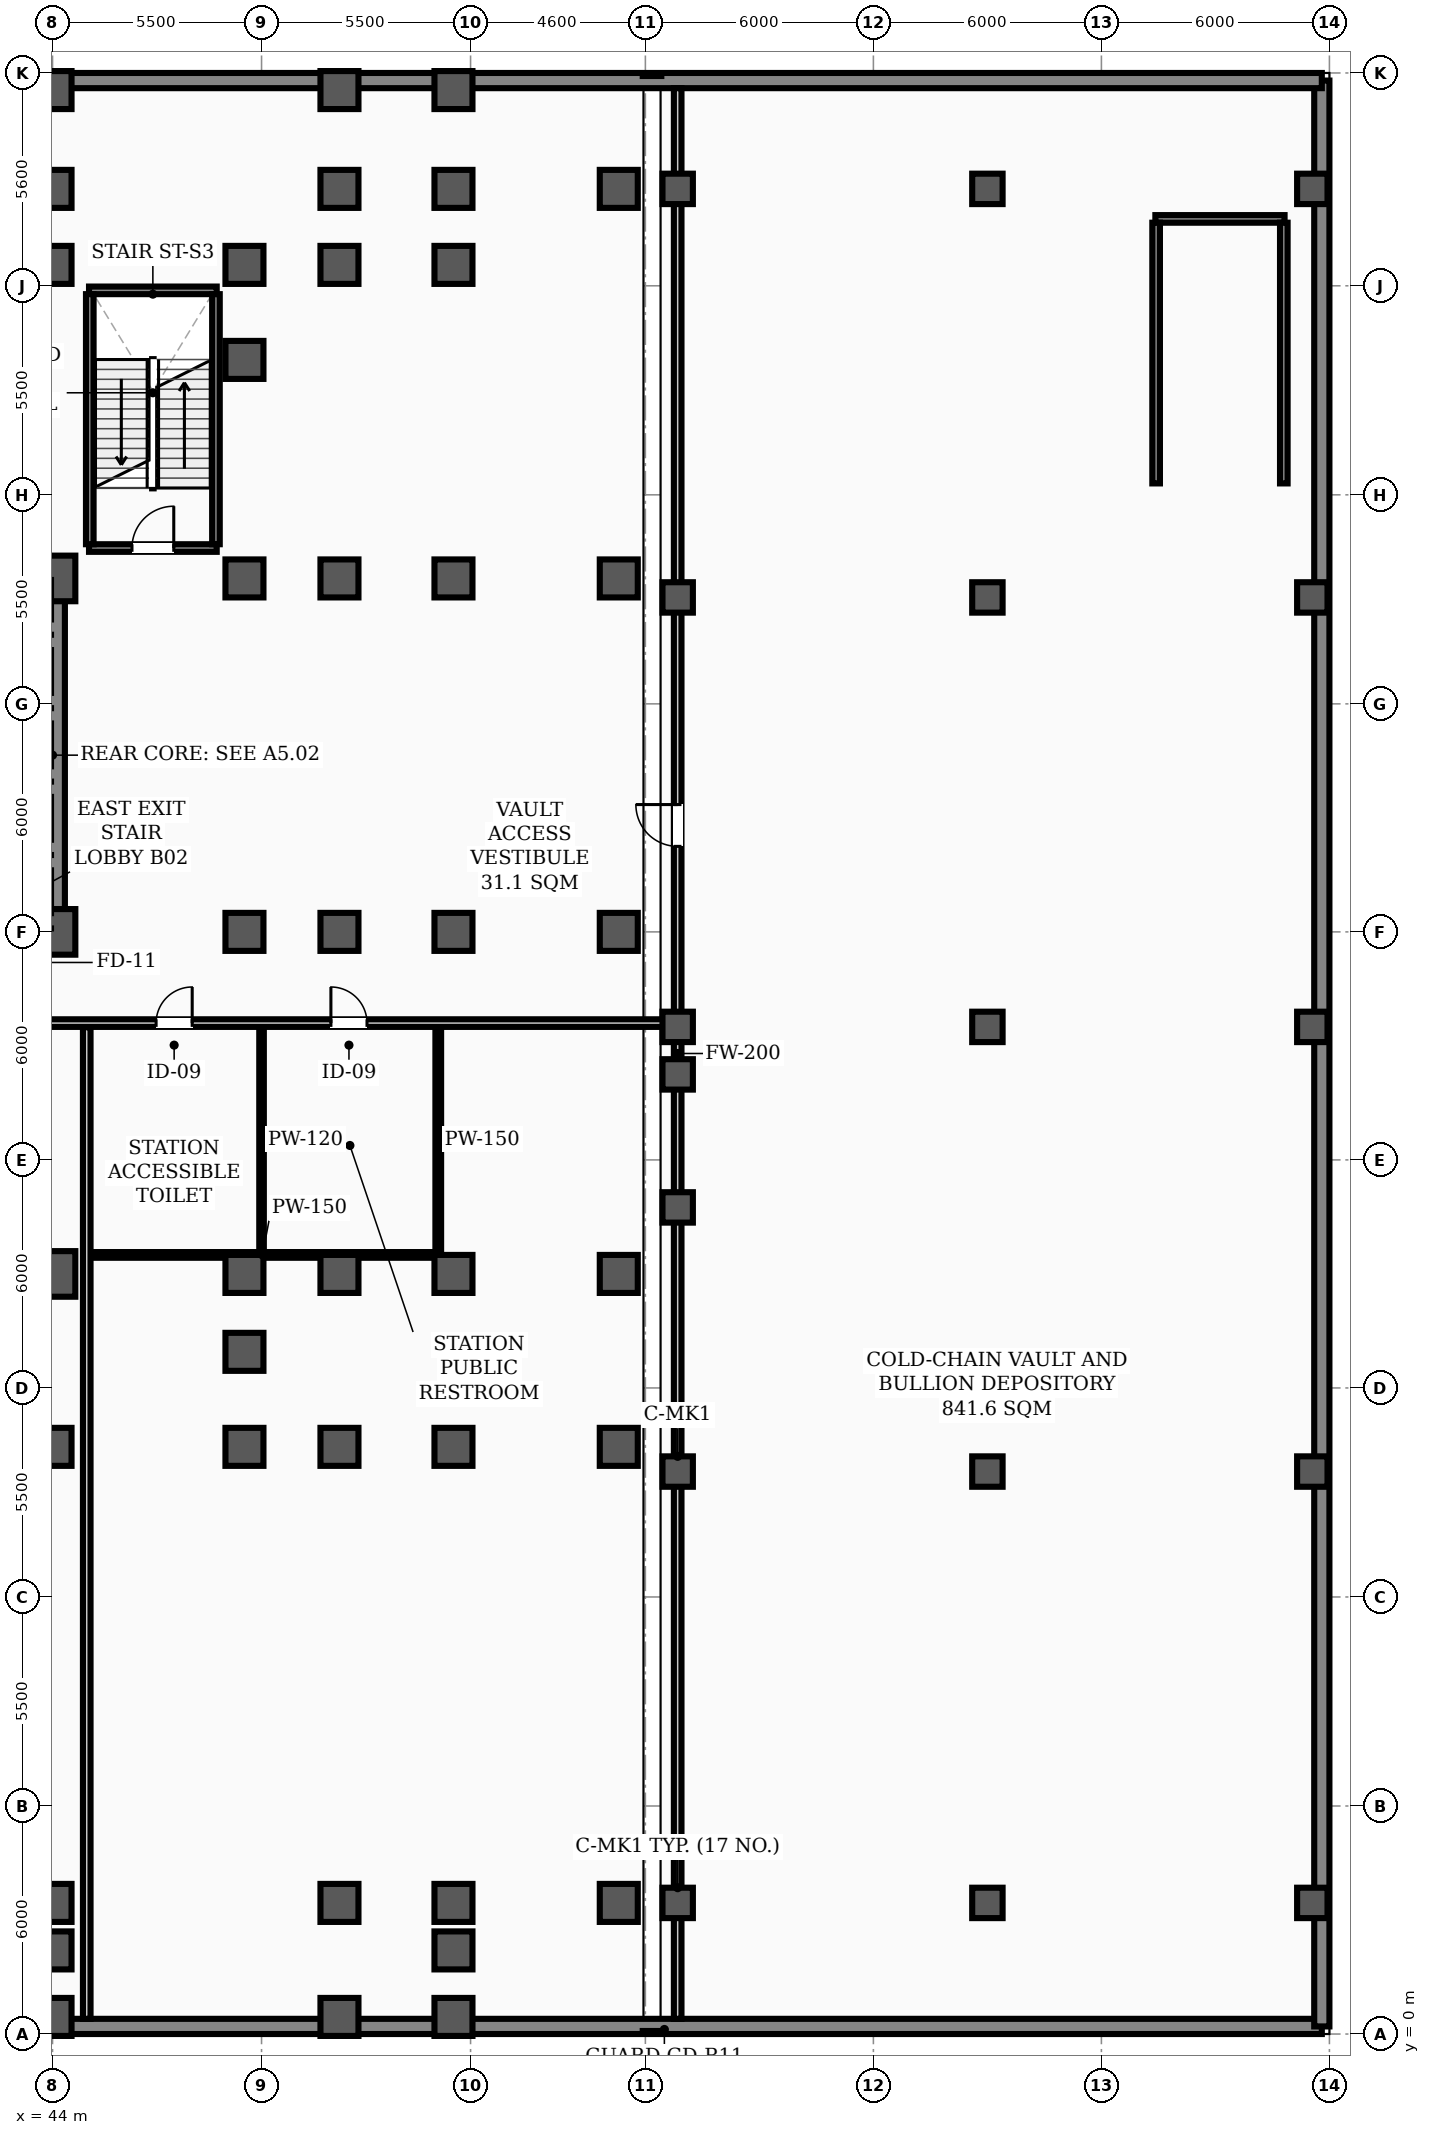
"""IFC4 building model, lengths in metres.
Left out: names, types, materials, properties, quantities, classifications, styles, units other than length and angle.
Written with IfcOpenShell. Run it as: python <this file> out.ifc"""

import sys

from ifc_helpers import new_model, si_unit, direction, frame, frame_2d, origin, origin_2d, place, context, subcontext, project, spatial, rectangle, hollow_rectangle, extrude, element, fill, save


model = new_model("IFC4")
c1 = context("Model", 3, precision=1e-05, world=origin(), true_north=direction((0.0, 1.0)))
c2 = subcontext(c1, "Body", "Model", "MODEL_VIEW")
j1 = project(units=[si_unit("LENGTHUNIT", "METRE"), si_unit("PLANEANGLEUNIT", "RADIAN")], contexts=[c1])
p1 = place(None, origin())
s1 = spatial("IfcSite", under=j1, at=p1, CompositionType="ELEMENT")
p2 = place(p1, origin())
s2 = spatial("IfcBuilding", under=s1, at=p2, CompositionType="ELEMENT")
p3 = place(p2, frame((0.0, 0.0, -10.2)))
s3 = spatial("IfcBuildingStorey", under=s2, at=p3, CompositionType="ELEMENT", Elevation=-10.2)
for number, where, z_axis, x_axis in (
    (1, (44.0, 29.0, 0.0), (0.0, 0.0, 1.0), (1.0, 0.0, 0.0)),
    (2, (44.0, 38.3, 0.0), (0.0, 0.0, 1.0), (1.0, 0.0, 0.0)),
    (3, (44.0, 20.0, 0.0), (0.0, 0.0, 1.0), (1.0, 0.0, 0.0)),
):
    element("IfcColumn", number, at=place(p3, frame(where, z_axis=z_axis, x_axis=x_axis)), inside=s3, PredefinedType="COLUMN", context=c2, shape_type="SweptSolid", body=[
        extrude(hollow_rectangle(XDim=1.2, YDim=1.2, WallThickness=0.04, InnerFilletRadius=0.02, OuterFilletRadius=0.06, at=origin_2d()), origin(), (0.0, 0.0, 1.0), 5.2),
    ])
for number, where, z_axis, x_axis in (
    (4, (44.0, 0.45, 0.0), (0.0, 0.0, 1.0), (1.0, 0.0, 0.0)),
    (5, (44.0, 2.2, 0.0), (0.0, 0.0, 1.0), (1.0, 0.0, 0.0)),
    (6, (44.0, 3.45, 0.0), (0.0, 0.0, 1.0), (1.0, 0.0, 0.0)),
    (7, (44.0, 15.45, 0.0), (0.0, 0.0, 1.0), (1.0, 0.0, 0.0)),
    (8, (44.0, 46.55, 0.0), (0.0, 0.0, 1.0), (1.0, 0.0, 0.0)),
    (9, (44.0, 48.55, 0.0), (0.0, 0.0, 1.0), (1.0, 0.0, 0.0)),
    (10, (44.0, 51.15, 0.0), (0.0, 0.0, 1.0), (1.0, 0.0, 0.0)),
    (11, (49.05, 15.45, 0.0), (0.0, 0.0, 1.0), (1.0, 0.0, 0.0)),
    (12, (49.05, 17.95, 0.0), (0.0, 0.0, 1.0), (1.0, 0.0, 0.0)),
    (13, (49.05, 20.0, 0.0), (0.0, 0.0, 1.0), (1.0, 0.0, 0.0)),
    (14, (49.05, 29.0, 0.0), (0.0, 0.0, 1.0), (1.0, 0.0, 0.0)),
    (15, (49.05, 38.3, 0.0), (0.0, 0.0, 1.0), (1.0, 0.0, 0.0)),
    (16, (49.05, 44.05, 0.0), (0.0, 0.0, 1.0), (1.0, 0.0, 0.0)),
    (17, (49.05, 46.55, 0.0), (0.0, 0.0, 1.0), (1.0, 0.0, 0.0)),
    (18, (51.55, 0.45, 0.0), (0.0, 0.0, 1.0), (1.0, 0.0, 0.0)),
    (19, (51.55, 3.45, 0.0), (0.0, 0.0, 1.0), (1.0, 0.0, 0.0)),
    (20, (51.55, 15.45, 0.0), (0.0, 0.0, 1.0), (1.0, 0.0, 0.0)),
    (21, (51.55, 20.0, 0.0), (0.0, 0.0, 1.0), (1.0, 0.0, 0.0)),
    (22, (51.55, 29.0, 0.0), (0.0, 0.0, 1.0), (1.0, 0.0, 0.0)),
    (23, (51.55, 38.3, 0.0), (0.0, 0.0, 1.0), (1.0, 0.0, 0.0)),
    (24, (51.55, 46.55, 0.0), (0.0, 0.0, 1.0), (1.0, 0.0, 0.0)),
    (25, (51.55, 48.55, 0.0), (0.0, 0.0, 1.0), (1.0, 0.0, 0.0)),
    (26, (51.55, 51.15, 0.0), (0.0, 0.0, 1.0), (1.0, 0.0, 0.0)),
    (27, (54.55, 0.45, 0.0), (0.0, 0.0, 1.0), (1.0, 0.0, 0.0)),
    (28, (54.55, 2.2, 0.0), (0.0, 0.0, 1.0), (1.0, 0.0, 0.0)),
    (29, (54.55, 3.45, 0.0), (0.0, 0.0, 1.0), (1.0, 0.0, 0.0)),
    (30, (54.55, 15.45, 0.0), (0.0, 0.0, 1.0), (1.0, 0.0, 0.0)),
    (31, (54.55, 20.0, 0.0), (0.0, 0.0, 1.0), (1.0, 0.0, 0.0)),
    (32, (54.55, 29.0, 0.0), (0.0, 0.0, 1.0), (1.0, 0.0, 0.0)),
    (33, (54.55, 38.3, 0.0), (0.0, 0.0, 1.0), (1.0, 0.0, 0.0)),
    (34, (54.55, 46.55, 0.0), (0.0, 0.0, 1.0), (1.0, 0.0, 0.0)),
    (35, (54.55, 48.55, 0.0), (0.0, 0.0, 1.0), (1.0, 0.0, 0.0)),
    (36, (54.55, 51.15, 0.0), (0.0, 0.0, 1.0), (1.0, 0.0, 0.0)),
    (37, (58.9, 3.45, 0.0), (0.0, 0.0, 1.0), (1.0, 0.0, 0.0)),
    (38, (58.9, 15.45, 0.0), (0.0, 0.0, 1.0), (1.0, 0.0, 0.0)),
    (39, (58.9, 20.0, 0.0), (0.0, 0.0, 1.0), (1.0, 0.0, 0.0)),
    (40, (58.9, 29.0, 0.0), (0.0, 0.0, 1.0), (1.0, 0.0, 0.0)),
    (41, (58.9, 38.3, 0.0), (0.0, 0.0, 1.0), (1.0, 0.0, 0.0)),
    (42, (58.9, 48.55, 0.0), (0.0, 0.0, 1.0), (1.0, 0.0, 0.0)),
):
    element("IfcColumn", number, at=place(p3, frame(where, z_axis=z_axis, x_axis=x_axis)), inside=s3, PredefinedType="COLUMN", context=c2, shape_type="SweptSolid", body=[
        extrude(rectangle(XDim=1.0, YDim=1.0, at=origin_2d()), origin(), (0.0, 0.0, 1.0), 5.2),
    ])
for number, where, z_axis, x_axis in (
    (43, (60.45, 3.45, 0.0), (0.0, 0.0, 1.0), (1.0, 0.0, 0.0)),
    (44, (60.45, 14.8, 0.0), (0.0, 0.0, 1.0), (1.0, 0.0, 0.0)),
    (45, (60.45, 21.75, 0.0), (0.0, 0.0, 1.0), (1.0, 0.0, 0.0)),
    (46, (60.45, 25.25, 0.0), (0.0, 0.0, 1.0), (1.0, 0.0, 0.0)),
    (47, (60.45, 26.5, 0.0), (0.0, 0.0, 1.0), (1.0, 0.0, 0.0)),
    (48, (60.45, 37.8, 0.0), (0.0, 0.0, 1.0), (1.0, 0.0, 0.0)),
    (49, (60.45, 48.55, 0.0), (0.0, 0.0, 1.0), (1.0, 0.0, 0.0)),
    (50, (68.6, 3.45, 0.0), (0.0, 0.0, 1.0), (1.0, 0.0, 0.0)),
    (51, (68.6, 14.8, 0.0), (0.0, 0.0, 1.0), (1.0, 0.0, 0.0)),
    (52, (68.6, 26.5, 0.0), (0.0, 0.0, 1.0), (1.0, 0.0, 0.0)),
    (53, (68.6, 37.8, 0.0), (0.0, 0.0, 1.0), (1.0, 0.0, 0.0)),
    (54, (68.6, 48.55, 0.0), (0.0, 0.0, 1.0), (1.0, 0.0, 0.0)),
    (55, (77.15, 3.45, 0.0), (0.0, 0.0, 1.0), (1.0, 0.0, 0.0)),
    (56, (77.15, 14.8, 0.0), (0.0, 0.0, 1.0), (1.0, 0.0, 0.0)),
    (57, (77.15, 26.5, 0.0), (0.0, 0.0, 1.0), (1.0, 0.0, 0.0)),
    (58, (77.15, 37.8, 0.0), (0.0, 0.0, 1.0), (1.0, 0.0, 0.0)),
    (59, (77.15, 48.55, 0.0), (0.0, 0.0, 1.0), (1.0, 0.0, 0.0)),
):
    element("IfcColumn", number, at=place(p3, frame(where, z_axis=z_axis, x_axis=x_axis)), inside=s3, PredefinedType="COLUMN", context=c2, shape_type="SweptSolid", body=[
        extrude(rectangle(XDim=0.8, YDim=0.8, at=origin_2d()), origin(), (0.0, 0.0, 1.0), 5.2),
    ])
p4 = place(p3, frame((0.2, 0.2, 0.0), z_axis=(0.0, 0.0, 1.0), x_axis=(1.0, 0.0, 0.0)))
e60 = element("IfcWall", 60, at=p4, inside=s3, PredefinedType="SOLIDWALL", context=c2, shape_type="SweptSolid", body=[
    extrude(rectangle(XDim=77.2, YDim=0.4, at=frame_2d((38.6, 0.0))), origin(), (0.0, 0.0, 1.0), 4.92),
])
p5 = place(p3, frame((77.4, 0.2, 0.0), z_axis=(0.0, 0.0, 1.0), x_axis=(0.0, 1.0, 0.0)))
e61 = element("IfcWall", 61, at=p5, inside=s3, PredefinedType="SOLIDWALL", context=c2, shape_type="SweptSolid", body=[
    extrude(rectangle(XDim=51.2, YDim=0.4, at=frame_2d((25.6, 0.0))), origin(), (0.0, 0.0, 1.0), 4.92),
])
p6 = place(p3, frame((77.4, 51.4, 0.0), z_axis=(0.0, 0.0, 1.0), x_axis=(-1.0, 0.0, 0.0)))
e62 = element("IfcWall", 62, at=p6, inside=s3, PredefinedType="SOLIDWALL", context=c2, shape_type="SweptSolid", body=[
    extrude(rectangle(XDim=77.2, YDim=0.4, at=frame_2d((38.6, 0.0))), origin(), (0.0, 0.0, 1.0), 4.92),
])
p7 = place(p3, frame((44.0, 29.35, 0.0), z_axis=(0.0, 0.0, 1.0), x_axis=(0.0, 1.0, 0.0)))
e63 = element("IfcWall", 63, at=p7, inside=s3, PredefinedType="SHEAR", context=c2, shape_type="SweptSolid", body=[
    extrude(rectangle(XDim=8.6, YDim=0.65, at=frame_2d((4.3, 0.0))), origin(), (0.0, 0.0, 1.0), 4.92),
])
p8 = place(p3, frame((73.02, 47.76, 0.0), z_axis=(0.0, 0.0, 1.0), x_axis=(1.0, 0.0, 0.0)))
e64 = element("IfcWall", 64, at=p8, inside=s3, PredefinedType="STANDARD", context=c2, shape_type="SweptSolid", body=[
    extrude(rectangle(XDim=3.4, YDim=0.2, at=frame_2d((1.7, 0.0))), origin(), (0.0, 0.0, 1.0), 4.92),
])
for number, where, z_axis, x_axis in (
    (65, (73.04, 40.8, 0.0), (0.0, 0.0, 1.0), (0.0, 1.0, 0.0)),
    (66, (76.4, 40.8, 0.0), (0.0, 0.0, 1.0), (0.0, 1.0, 0.0)),
):
    element("IfcWall", number, at=place(p3, frame(where, z_axis=z_axis, x_axis=x_axis)), inside=s3, PredefinedType="STANDARD", context=c2, shape_type="SweptSolid", body=[
        extrude(rectangle(XDim=6.86, YDim=0.2, at=frame_2d((3.43, 0.0))), origin(), (0.0, 0.0, 1.0), 4.92),
    ])
p9 = place(p3, frame((44.96, 39.1, 0.0), z_axis=(0.0, 0.0, 1.0), x_axis=(1.0, 0.0, 0.0)))
e67 = element("IfcWall", 67, at=p9, inside=s3, PredefinedType="STANDARD", context=c2, shape_type="SweptSolid", body=[
    extrude(rectangle(XDim=3.36, YDim=0.2, at=frame_2d((1.68, 0.0))), origin(), (0.0, 0.0, 1.0), 4.92),
])
p10 = place(p9, frame((1.13, 0.0, 0.0)))
e68 = element("IfcOpeningElement", 68, at=p10, cuts=e67, PredefinedType="OPENING", context=c2, shape_type="SweptSolid", body=[
    extrude(rectangle(XDim=1.1, YDim=2.08, at=frame_2d((0.55, 1.04))), frame((0.0, 0.11, 0.0), z_axis=(0.0, -1.0, 0.0), x_axis=(1.0, 0.0, 0.0)), (0.0, 0.0, 1.0), 0.22),
])
p11 = place(p3, frame((44.96, 45.88, 0.0), z_axis=(0.0, 0.0, 1.0), x_axis=(1.0, 0.0, 0.0)))
e69 = element("IfcWall", 69, at=p11, inside=s3, PredefinedType="STANDARD", context=c2, shape_type="SweptSolid", body=[
    extrude(rectangle(XDim=3.36, YDim=0.2, at=frame_2d((1.68, 0.0))), origin(), (0.0, 0.0, 1.0), 4.92),
])
for number, where, z_axis, x_axis in (
    (70, (44.98, 39.2, 0.0), (0.0, 0.0, 1.0), (0.0, 1.0, 0.0)),
    (71, (48.3, 39.2, 0.0), (0.0, 0.0, 1.0), (0.0, 1.0, 0.0)),
):
    element("IfcWall", number, at=place(p3, frame(where, z_axis=z_axis, x_axis=x_axis)), inside=s3, PredefinedType="STANDARD", context=c2, shape_type="SweptSolid", body=[
        extrude(rectangle(XDim=6.58, YDim=0.2, at=frame_2d((3.29, 0.0))), origin(), (0.0, 0.0, 1.0), 4.92),
    ])
p12 = place(p3, frame((0.4, 26.6, 0.0), z_axis=(0.0, 0.0, 1.0), x_axis=(1.0, 0.0, 0.0)))
e72 = element("IfcWall", 72, at=p12, inside=s3, PredefinedType="STANDARD", context=c2, shape_type="SweptSolid", body=[
    extrude(rectangle(XDim=60.05, YDim=0.2, at=frame_2d((30.025, 0.0))), origin(), (0.0, 0.0, 1.0), 4.2),
])
p13 = place(p12, frame((18.2, 0.0, 0.0)))
e73 = element("IfcOpeningElement", 73, at=p13, cuts=e72, PredefinedType="OPENING", context=c2, shape_type="SweptSolid", body=[
    extrude(rectangle(XDim=1.8, YDim=2.08, at=frame_2d((0.9, 1.04))), frame((0.0, 0.11, 0.0), z_axis=(0.0, -1.0, 0.0), x_axis=(1.0, 0.0, 0.0)), (0.0, 0.0, 1.0), 0.22),
])
p14 = place(p12, frame((40.25, 0.0, 0.0)))
e74 = element("IfcOpeningElement", 74, at=p14, cuts=e72, PredefinedType="OPENING", context=c2, shape_type="SweptSolid", body=[
    extrude(rectangle(XDim=1.1, YDim=2.08, at=frame_2d((0.55, 1.04))), frame((0.0, 0.11, 0.0), z_axis=(0.0, -1.0, 0.0), x_axis=(1.0, 0.0, 0.0)), (0.0, 0.0, 1.0), 0.22),
])
p15 = place(p12, frame((46.325, 0.0, 0.0)))
e75 = element("IfcOpeningElement", 75, at=p15, cuts=e72, PredefinedType="OPENING", context=c2, shape_type="SweptSolid", body=[
    extrude(rectangle(XDim=0.95, YDim=2.08, at=frame_2d((0.475, 1.04))), frame((0.0, 0.11, 0.0), z_axis=(0.0, -1.0, 0.0), x_axis=(1.0, 0.0, 0.0)), (0.0, 0.0, 1.0), 0.22),
])
p16 = place(p12, frame((50.925, 0.0, 0.0)))
e76 = element("IfcOpeningElement", 76, at=p16, cuts=e72, PredefinedType="OPENING", context=c2, shape_type="SweptSolid", body=[
    extrude(rectangle(XDim=0.95, YDim=2.08, at=frame_2d((0.475, 1.04))), frame((0.0, 0.11, 0.0), z_axis=(0.0, -1.0, 0.0), x_axis=(1.0, 0.0, 0.0)), (0.0, 0.0, 1.0), 0.22),
])
p17 = place(p3, frame((44.9, 20.5, 0.0), z_axis=(0.0, 0.0, 1.0), x_axis=(1.0, 0.0, 0.0)))
e77 = element("IfcWall", 77, at=p17, inside=s3, PredefinedType="PARTITIONING", context=c2, shape_type="SweptSolid", body=[
    extrude(rectangle(XDim=9.25, YDim=0.15, at=frame_2d((4.625, 0.0))), origin(), (0.0, 0.0, 1.0), 4.1),
])
p18 = place(p3, frame((44.9, 0.4, 0.0), z_axis=(0.0, 0.0, 1.0), x_axis=(0.0, 1.0, 0.0)))
e78 = element("IfcWall", 78, at=p18, inside=s3, PredefinedType="STANDARD", context=c2, shape_type="SweptSolid", body=[
    extrude(rectangle(XDim=26.09, YDim=0.2, at=frame_2d((13.045, 0.0))), origin(), (0.0, 0.0, 1.0), 4.1),
])
p19 = place(p3, frame((49.5, 20.585, 0.0), z_axis=(0.0, 0.0, 1.0), x_axis=(0.0, 1.0, 0.0)))
e79 = element("IfcWall", 79, at=p19, inside=s3, PredefinedType="PARTITIONING", context=c2, shape_type="SweptSolid", body=[
    extrude(rectangle(XDim=5.905, YDim=0.12, at=frame_2d((2.953, 0.0))), origin(), (0.0, 0.0, 1.0), 4.1),
])
p20 = place(p3, frame((54.15, 20.585, 0.0), z_axis=(0.0, 0.0, 1.0), x_axis=(0.0, 1.0, 0.0)))
e80 = element("IfcWall", 80, at=p20, inside=s3, PredefinedType="PARTITIONING", context=c2, shape_type="SweptSolid", body=[
    extrude(rectangle(XDim=5.905, YDim=0.15, at=frame_2d((2.953, 0.0))), origin(), (0.0, 0.0, 1.0), 4.1),
])
p21 = place(p3, frame((60.45, 0.4, 0.0), z_axis=(0.0, 0.0, 1.0), x_axis=(0.0, 1.0, 0.0)))
e81 = element("IfcWall", 81, at=p21, inside=s3, PredefinedType="STANDARD", context=c2, shape_type="SweptSolid", body=[
    extrude(rectangle(XDim=50.8, YDim=0.2, at=frame_2d((25.4, 0.0))), origin(), (0.0, 0.0, 1.0), 4.2),
])
p22 = place(p21, frame((30.85, 0.0, 0.0)))
e82 = element("IfcOpeningElement", 82, at=p22, cuts=e81, PredefinedType="OPENING", context=c2, shape_type="SweptSolid", body=[
    extrude(rectangle(XDim=1.1, YDim=2.08, at=frame_2d((0.55, 1.04))), frame((0.0, 0.11, 0.0), z_axis=(0.0, -1.0, 0.0), x_axis=(1.0, 0.0, 0.0)), (0.0, 0.0, 1.0), 0.22),
])
p23 = place(p10, origin())
e83 = element("IfcDoor", 83, at=p23, inside=s3, OperationType="SINGLE_SWING_RIGHT", PredefinedType="DOOR", context=c2, shape_type="SweptSolid", body=[
    extrude(rectangle(XDim=1.1, YDim=2.08, at=frame_2d((0.55, 1.04))), frame((0.0, 0.025, 0.0), z_axis=(0.0, -1.0, 0.0), x_axis=(1.0, 0.0, 0.0)), (0.0, 0.0, 1.0), 0.05),
])
fill(e68, e83)
p24 = place(p15, origin())
e84 = element("IfcDoor", 84, at=p24, inside=s3, OperationType="SINGLE_SWING_RIGHT", PredefinedType="DOOR", context=c2, shape_type="SweptSolid", body=[
    extrude(rectangle(XDim=0.95, YDim=2.08, at=frame_2d((0.475, 1.04))), frame((0.0, 0.025, 0.0), z_axis=(0.0, -1.0, 0.0), x_axis=(1.0, 0.0, 0.0)), (0.0, 0.0, 1.0), 0.05),
])
fill(e75, e84)
p25 = place(p16, origin())
e85 = element("IfcDoor", 85, at=p25, inside=s3, OperationType="SINGLE_SWING_LEFT", PredefinedType="DOOR", context=c2, shape_type="SweptSolid", body=[
    extrude(rectangle(XDim=0.95, YDim=2.08, at=frame_2d((0.475, 1.04))), frame((0.0, 0.025, 0.0), z_axis=(0.0, -1.0, 0.0), x_axis=(1.0, 0.0, 0.0)), (0.0, 0.0, 1.0), 0.05),
])
fill(e76, e85)
p26 = place(p22, origin())
e86 = element("IfcDoor", 86, at=p26, inside=s3, OperationType="SINGLE_SWING_RIGHT", PredefinedType="DOOR", context=c2, shape_type="SweptSolid", body=[
    extrude(rectangle(XDim=1.1, YDim=2.08, at=frame_2d((0.55, 1.04))), frame((0.0, 0.025, 0.0), z_axis=(0.0, -1.0, 0.0), x_axis=(1.0, 0.0, 0.0)), (0.0, 0.0, 1.0), 0.05),
])
fill(e82, e86)
save(model, sys.argv[1])
